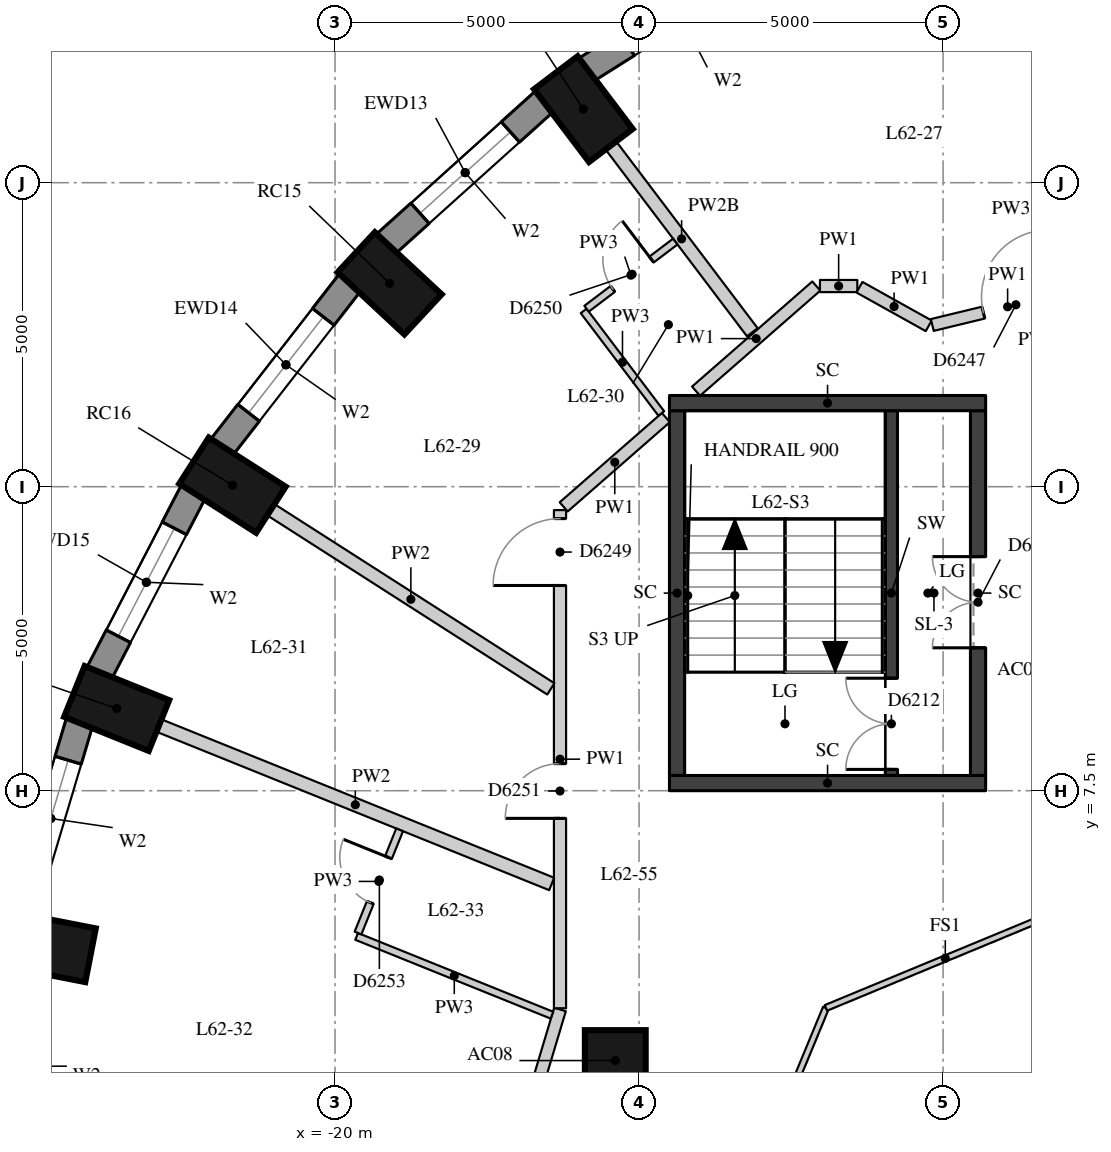
"""IFC4 building model, lengths in metres.
Left out: names, types, materials, properties, quantities, classifications, styles, units other than length and angle.
Written with IfcOpenShell. Run it as: python <this file> out.ifc"""

import sys

from ifc_helpers import new_model, si_unit, direction, frame, frame_2d, origin, origin_2d, place, context, subcontext, project, spatial, rectangle, extrude, element, fill, save


model = new_model("IFC4")
c1 = context("Model", 3, precision=1e-05, world=origin(), true_north=direction((0.0, 1.0)))
c2 = subcontext(c1, "Body", "Model", "MODEL_VIEW")
j1 = project(units=[si_unit("LENGTHUNIT", "METRE"), si_unit("PLANEANGLEUNIT", "RADIAN")], contexts=[c1])
p1 = place(None, origin())
s1 = spatial("IfcSite", under=j1, at=p1, CompositionType="ELEMENT")
p2 = place(p1, origin())
s2 = spatial("IfcBuilding", under=s1, at=p2, CompositionType="ELEMENT")
p3 = place(p2, frame((0.0, 0.0, 218.9)))
s3 = spatial("IfcBuildingStorey", under=s2, at=p3, CompositionType="ELEMENT", Elevation=218.9)
for number, where, z_axis, x_axis in (
    (1, (-15.916, 18.71, 0.0), (0.0, 0.0, 1.0), (-0.604, 0.797, 0.0)),
    (2, (-19.102, 15.845, 0.0), (0.0, 0.0, 1.0), (-0.732, 0.681, 0.0)),
    (3, (-21.687, 12.525, 0.0), (0.0, 0.0, 1.0), (-0.842, 0.539, 0.0)),
    (4, (-23.591, 8.852, 0.0), (0.0, 0.0, 1.0), (-0.927, 0.374, 0.0)),
    (5, (-24.757, 4.937, 0.0), (0.0, 0.0, 1.0), (-0.981, 0.192, 0.0)),
):
    element("IfcColumn", number, at=place(p3, frame(where, z_axis=z_axis, x_axis=x_axis)), inside=s3, PredefinedType="COLUMN", context=c2, shape_type="SweptSolid", body=[
        extrude(rectangle(XDim=1.5, YDim=0.9, at=origin_2d()), origin(), (0.0, 0.0, 1.0), 3.3),
    ])
p4 = place(p3, frame((-15.391, 3.062, 0.0), z_axis=(0.0, 0.0, 1.0), x_axis=(1.0, 0.0, 0.0)))
e6 = element("IfcColumn", 6, at=p4, inside=s3, PredefinedType="COLUMN", context=c2, shape_type="SweptSolid", body=[
    extrude(rectangle(XDim=1.0, YDim=1.0, at=origin_2d()), origin(), (0.0, 0.0, 1.0), 3.3),
])
p5 = place(p3, frame((-12.832, 21.27, 0.0), z_axis=(0.0, 0.0, 1.0), x_axis=(-0.846138482752, -0.532963101918, 0.0)))
e7 = element("IfcWall", 7, at=p5, inside=s3, PredefinedType="SOLIDWALL", context=c2, shape_type="SweptSolid", body=[
    extrude(rectangle(XDim=3.587, YDim=0.45, at=frame_2d((1.793, 0.0))), origin(), (0.0, 0.0, 1.0), 3.02),
])
p6 = place(p5, frame((0.793, 0.0, 0.4)))
e8 = element("IfcOpeningElement", 8, at=p6, cuts=e7, PredefinedType="OPENING", context=c2, shape_type="SweptSolid", body=[
    extrude(rectangle(XDim=2.0, YDim=1.75, at=frame_2d((1.0, 0.875))), frame((0.0, 0.235, 0.0), z_axis=(0.0, -1.0, 0.0), x_axis=(1.0, 0.0, 0.0)), (0.0, 0.0, 1.0), 0.47),
])
p7 = place(p3, frame((-16.553, 18.84, 0.0), z_axis=(0.0, 0.0, 1.0), x_axis=(-0.743442727602, -0.668799604348, 0.0)))
e9 = element("IfcWall", 9, at=p7, inside=s3, PredefinedType="SOLIDWALL", context=c2, shape_type="SweptSolid", body=[
    extrude(rectangle(XDim=3.513, YDim=0.45, at=frame_2d((1.756, 0.0))), origin(), (0.0, 0.0, 1.0), 3.02),
])
p8 = place(p7, frame((0.756, 0.0, 0.4)))
e10 = element("IfcOpeningElement", 10, at=p8, cuts=e9, PredefinedType="OPENING", context=c2, shape_type="SweptSolid", body=[
    extrude(rectangle(XDim=2.0, YDim=1.75, at=frame_2d((1.0, 0.875))), frame((0.0, 0.235, 0.0), z_axis=(0.0, -1.0, 0.0), x_axis=(1.0, 0.0, 0.0)), (0.0, 0.0, 1.0), 0.47),
])
p9 = place(p3, frame((-19.751, 15.861, 0.0), z_axis=(0.0, 0.0, 1.0), x_axis=(-0.614220816451, -0.789134201919, 0.0)))
e11 = element("IfcWall", 11, at=p9, inside=s3, PredefinedType="SOLIDWALL", context=c2, shape_type="SweptSolid", body=[
    extrude(rectangle(XDim=3.438, YDim=0.45, at=frame_2d((1.719, 0.0))), origin(), (0.0, 0.0, 1.0), 3.02),
])
p10 = place(p9, frame((0.719, 0.0, 0.4)))
e12 = element("IfcOpeningElement", 12, at=p10, cuts=e11, PredefinedType="OPENING", context=c2, shape_type="SweptSolid", body=[
    extrude(rectangle(XDim=2.0, YDim=1.75, at=frame_2d((1.0, 0.875))), frame((0.0, 0.235, 0.0), z_axis=(0.0, -1.0, 0.0), x_axis=(1.0, 0.0, 0.0)), (0.0, 0.0, 1.0), 0.47),
])
p11 = place(p3, frame((-22.327, 12.424, 0.0), z_axis=(0.0, 0.0, 1.0), x_axis=(-0.460232593174, -0.887798378113, 0.0)))
e13 = element("IfcWall", 13, at=p11, inside=s3, PredefinedType="SOLIDWALL", context=c2, shape_type="SweptSolid", body=[
    extrude(rectangle(XDim=3.371, YDim=0.45, at=frame_2d((1.685, 0.0))), origin(), (0.0, 0.0, 1.0), 3.02),
])
p12 = place(p11, frame((0.685, 0.0, 0.4)))
e14 = element("IfcOpeningElement", 14, at=p12, cuts=e13, PredefinedType="OPENING", context=c2, shape_type="SweptSolid", body=[
    extrude(rectangle(XDim=2.0, YDim=1.75, at=frame_2d((1.0, 0.875))), frame((0.0, 0.235, 0.0), z_axis=(0.0, -1.0, 0.0), x_axis=(1.0, 0.0, 0.0)), (0.0, 0.0, 1.0), 0.47),
])
p13 = place(p3, frame((-24.2, 8.634, 0.0), z_axis=(0.0, 0.0, 1.0), x_axis=(-0.285444972963, -0.958395099847, 0.0)))
e15 = element("IfcWall", 15, at=p13, inside=s3, PredefinedType="SOLIDWALL", context=c2, shape_type="SweptSolid", body=[
    extrude(rectangle(XDim=3.32, YDim=0.45, at=frame_2d((1.66, 0.0))), origin(), (0.0, 0.0, 1.0), 3.02),
])
p14 = place(p13, frame((0.66, 0.0, 0.4)))
e16 = element("IfcOpeningElement", 16, at=p14, cuts=e15, PredefinedType="OPENING", context=c2, shape_type="SweptSolid", body=[
    extrude(rectangle(XDim=2.0, YDim=1.75, at=frame_2d((1.0, 0.875))), frame((0.0, 0.235, 0.0), z_axis=(0.0, -1.0, 0.0), x_axis=(1.0, 0.0, 0.0)), (0.0, 0.0, 1.0), 0.47),
])
p15 = place(p3, frame((-10.85, 7.75, 0.0), z_axis=(0.0, 0.0, 1.0), x_axis=(0.0, 1.0, 0.0)))
e17 = element("IfcWall", 17, at=p15, inside=s3, PredefinedType="SHEAR", context=c2, shape_type="SweptSolid", body=[
    extrude(rectangle(XDim=6.0, YDim=0.2, at=frame_2d((3.0, 0.0))), origin(), (0.0, 0.0, 1.0), 3.02),
])
p16 = place(p15, frame((0.1, 0.0, 0.0)))
e18 = element("IfcOpeningElement", 18, at=p16, cuts=e17, PredefinedType="OPENING", context=c2, shape_type="SweptSolid", body=[
    extrude(rectangle(XDim=1.5, YDim=2.1, at=frame_2d((0.75, 1.05))), frame((0.0, 0.11, 0.0), z_axis=(0.0, -1.0, 0.0), x_axis=(1.0, 0.0, 0.0)), (0.0, 0.0, 1.0), 0.22),
])
p17 = place(p3, frame((-14.375, 7.75, -0.28), z_axis=(0.0, 0.0, 1.0), x_axis=(0.0, 1.0, 0.0)))
e19 = element("IfcWall", 19, at=p17, inside=s3, PredefinedType="SHEAR", context=c2, shape_type="SweptSolid", body=[
    extrude(rectangle(XDim=6.0, YDim=0.25, at=frame_2d((3.0, 0.0))), origin(), (0.0, 0.0, 1.0), 3.3),
])
p18 = place(p3, frame((-9.425, 7.75, -0.28), z_axis=(0.0, 0.0, 1.0), x_axis=(0.0, 1.0, 0.0)))
e20 = element("IfcWall", 20, at=p18, inside=s3, PredefinedType="SHEAR", context=c2, shape_type="SweptSolid", body=[
    extrude(rectangle(XDim=6.0, YDim=0.25, at=frame_2d((3.0, 0.0))), origin(), (0.0, 0.0, 1.0), 3.3),
])
p19 = place(p18, frame((2.1, 0.0, 0.28)))
e21 = element("IfcOpeningElement", 21, at=p19, cuts=e20, PredefinedType="OPENING", context=c2, shape_type="SweptSolid", body=[
    extrude(rectangle(XDim=1.5, YDim=2.1, at=frame_2d((0.75, 1.05))), frame((0.0, 0.135, 0.0), z_axis=(0.0, -1.0, 0.0), x_axis=(1.0, 0.0, 0.0)), (0.0, 0.0, 1.0), 0.27),
])
for number, where, z_axis, x_axis in (
    (22, (-14.5, 13.875, -0.28), (0.0, 0.0, 1.0), (1.0, 0.0, 0.0)),
    (23, (-14.5, 7.625, -0.28), (0.0, 0.0, 1.0), (1.0, 0.0, 0.0)),
):
    element("IfcWall", number, at=place(p3, frame(where, z_axis=z_axis, x_axis=x_axis)), inside=s3, PredefinedType="SHEAR", context=c2, shape_type="SweptSolid", body=[
        extrude(rectangle(XDim=5.2, YDim=0.25, at=frame_2d((2.6, 0.0))), origin(), (0.0, 0.0, 1.0), 3.3),
    ])
p20 = place(p3, frame((-17.171, 0.995, 0.0), z_axis=(0.0, 0.0, 1.0), x_axis=(0.286919722033, 0.957954629984, 0.0)))
e24 = element("IfcWall", 24, at=p20, inside=s3, PredefinedType="PARTITIONING", context=c2, shape_type="SweptSolid", body=[
    extrude(rectangle(XDim=3.034, YDim=0.2, at=frame_2d((1.517, 0.0))), origin(), (0.0, 0.0, 1.0), 3.02),
])
p21 = place(p20, frame((0.365, 0.0, 0.0)))
e25 = element("IfcOpeningElement", 25, at=p21, cuts=e24, PredefinedType="OPENING", context=c2, shape_type="SweptSolid", body=[
    extrude(rectangle(XDim=1.1, YDim=2.1, at=frame_2d((0.55, 1.05))), frame((0.0, 0.11, 0.0), z_axis=(0.0, -1.0, 0.0), x_axis=(1.0, 0.0, 0.0)), (0.0, 0.0, 1.0), 0.22),
])
p22 = place(p3, frame((-16.3, 3.922, 0.0), z_axis=(0.0, 0.0, 1.0), x_axis=(0.0, 1.0, 0.0)))
e26 = element("IfcWall", 26, at=p22, inside=s3, PredefinedType="PARTITIONING", context=c2, shape_type="SweptSolid", body=[
    extrude(rectangle(XDim=8.193, YDim=0.2, at=frame_2d((4.097, 0.0))), origin(), (0.0, 0.0, 1.0), 3.02),
])
p23 = place(p22, frame((6.953, 0.0, 0.0)))
e27 = element("IfcOpeningElement", 27, at=p23, cuts=e26, PredefinedType="OPENING", context=c2, shape_type="SweptSolid", body=[
    extrude(rectangle(XDim=1.1, YDim=2.1, at=frame_2d((0.55, 1.05))), frame((0.0, 0.11, 0.0), z_axis=(0.0, -1.0, 0.0), x_axis=(1.0, 0.0, 0.0)), (0.0, 0.0, 1.0), 0.22),
])
p24 = place(p22, frame((3.123, 0.0, 0.0)))
e28 = element("IfcOpeningElement", 28, at=p24, cuts=e26, PredefinedType="OPENING", context=c2, shape_type="SweptSolid", body=[
    extrude(rectangle(XDim=0.9, YDim=2.1, at=frame_2d((0.45, 1.05))), frame((0.0, 0.11, 0.0), z_axis=(0.0, -1.0, 0.0), x_axis=(1.0, 0.0, 0.0)), (0.0, 0.0, 1.0), 0.22),
])
p25 = place(p3, frame((-16.24, 12.168, 0.0), z_axis=(0.0, 0.0, 1.0), x_axis=(0.752820521129, 0.658225844956, 0.0)))
e29 = element("IfcWall", 29, at=p25, inside=s3, PredefinedType="PARTITIONING", context=c2, shape_type="SweptSolid", body=[
    extrude(rectangle(XDim=2.232, YDim=0.2, at=frame_2d((1.116, 0.0))), origin(), (0.0, 0.0, 1.0), 3.02),
])
p26 = place(p3, frame((-14.063, 14.071, 0.0), z_axis=(0.0, 0.0, 1.0), x_axis=(0.752870230185, 0.6581689878, 0.0)))
e30 = element("IfcWall", 30, at=p26, inside=s3, PredefinedType="PARTITIONING", context=c2, shape_type="SweptSolid", body=[
    extrude(rectangle(XDim=2.627, YDim=0.2, at=frame_2d((1.313, 0.0))), origin(), (0.0, 0.0, 1.0), 3.02),
])
p27 = place(p3, frame((-12.025, 15.8, 0.0), z_axis=(0.0, 0.0, 1.0), x_axis=(1.0, 0.0, 0.0)))
e31 = element("IfcWall", 31, at=p27, inside=s3, PredefinedType="PARTITIONING", context=c2, shape_type="SweptSolid", body=[
    extrude(rectangle(XDim=0.615, YDim=0.2, at=frame_2d((0.307, 0.0))), origin(), (0.0, 0.0, 1.0), 3.02),
])
p28 = place(p3, frame((-11.375, 15.781, 0.0), z_axis=(0.0, 0.0, 1.0), x_axis=(0.873538410035, -0.486755222051, 0.0)))
e32 = element("IfcWall", 32, at=p28, inside=s3, PredefinedType="PARTITIONING", context=c2, shape_type="SweptSolid", body=[
    extrude(rectangle(XDim=1.304, YDim=0.2, at=frame_2d((0.652, 0.0))), origin(), (0.0, 0.0, 1.0), 3.02),
])
p29 = place(p3, frame((-10.177, 15.16, 0.0), z_axis=(0.0, 0.0, 1.0), x_axis=(0.971984190663, 0.235046236094, 0.0)))
e33 = element("IfcWall", 33, at=p29, inside=s3, PredefinedType="PARTITIONING", context=c2, shape_type="SweptSolid", body=[
    extrude(rectangle(XDim=2.549, YDim=0.2, at=frame_2d((1.274, 0.0))), origin(), (0.0, 0.0, 1.0), 3.02),
])
p30 = place(p29, frame((0.865, 0.0, 0.0)))
e34 = element("IfcOpeningElement", 34, at=p30, cuts=e33, PredefinedType="OPENING", context=c2, shape_type="SweptSolid", body=[
    extrude(rectangle(XDim=1.1, YDim=2.1, at=frame_2d((0.55, 1.05))), frame((0.0, 0.11, 0.0), z_axis=(0.0, -1.0, 0.0), x_axis=(1.0, 0.0, 0.0)), (0.0, 0.0, 1.0), 0.22),
])
p31 = place(p3, frame((-15.463, 18.113, 0.0), z_axis=(0.0, 0.0, 1.0), x_axis=(0.603591792806, -0.79729351412, 0.0)))
e35 = element("IfcWall", 35, at=p31, inside=s3, PredefinedType="PARTITIONING", context=c2, shape_type="SweptSolid", body=[
    extrude(rectangle(XDim=3.854, YDim=0.22, at=frame_2d((1.927, 0.0))), origin(), (0.0, 0.0, 1.0), 2.57),
])
p32 = place(p3, frame((-21.055, 12.121, 0.0), z_axis=(0.0, 0.0, 1.0), x_axis=(0.842286811608, -0.539029616061, 0.0)))
e36 = element("IfcWall", 36, at=p32, inside=s3, PredefinedType="PARTITIONING", context=c2, shape_type="SweptSolid", body=[
    extrude(rectangle(XDim=5.466, YDim=0.22, at=frame_2d((2.733, 0.0))), origin(), (0.0, 0.0, 1.0), 3.02),
])
p33 = place(p3, frame((-22.896, 8.571, 0.0), z_axis=(0.0, 0.0, 1.0), x_axis=(0.927387137769, -0.374103056256, 0.0)))
e37 = element("IfcWall", 37, at=p33, inside=s3, PredefinedType="PARTITIONING", context=c2, shape_type="SweptSolid", body=[
    extrude(rectangle(XDim=6.964, YDim=0.22, at=frame_2d((3.482, 0.0))), origin(), (0.0, 0.0, 1.0), 3.02),
])
p34 = place(p3, frame((-14.634, 13.704, 0.0), z_axis=(0.0, 0.0, 1.0), x_axis=(-0.603613230526, 0.797277284221, 0.0)))
e38 = element("IfcWall", 38, at=p34, inside=s3, PredefinedType="PARTITIONING", context=c2, shape_type="SweptSolid", body=[
    extrude(rectangle(XDim=2.115, YDim=0.12, at=frame_2d((1.058, 0.0))), origin(), (0.0, 0.0, 1.0), 3.02),
])
p35 = place(p3, frame((-16.433, 3.808, 0.0), z_axis=(0.0, 0.0, 1.0), x_axis=(-0.927374031513, 0.374135544522, 0.0)))
e39 = element("IfcWall", 39, at=p35, inside=s3, PredefinedType="PARTITIONING", context=c2, shape_type="SweptSolid", body=[
    extrude(rectangle(XDim=3.464, YDim=0.12, at=frame_2d((1.732, 0.0))), origin(), (0.0, 0.0, 1.0), 3.02),
])
p36 = place(p3, frame((-15.863, 15.427, 0.0), z_axis=(0.0, 0.0, 1.0), x_axis=(0.79730226728, 0.603580230451, 0.0)))
e40 = element("IfcWall", 40, at=p36, inside=s3, PredefinedType="PARTITIONING", context=c2, shape_type="SweptSolid", body=[
    extrude(rectangle(XDim=1.83, YDim=0.12, at=frame_2d((0.915, 0.0))), origin(), (0.0, 0.0, 1.0), 3.02),
])
p37 = place(p36, frame((0.54, 0.0, 0.0)))
e41 = element("IfcOpeningElement", 41, at=p37, cuts=e40, PredefinedType="OPENING", context=c2, shape_type="SweptSolid", body=[
    extrude(rectangle(XDim=0.8, YDim=2.1, at=frame_2d((0.4, 1.05))), frame((0.0, 0.07, 0.0), z_axis=(0.0, -1.0, 0.0), x_axis=(1.0, 0.0, 0.0)), (0.0, 0.0, 1.0), 0.14),
])
p38 = place(p3, frame((-19.622, 5.159, 0.0), z_axis=(0.0, 0.0, 1.0), x_axis=(0.373873925611, 0.927479534948, 0.0)))
e42 = element("IfcWall", 42, at=p38, inside=s3, PredefinedType="PARTITIONING", context=c2, shape_type="SweptSolid", body=[
    extrude(rectangle(XDim=1.83, YDim=0.12, at=frame_2d((0.915, 0.0))), origin(), (0.0, 0.0, 1.0), 3.02),
])
p39 = place(p38, frame((0.54, 0.0, 0.0)))
e43 = element("IfcOpeningElement", 43, at=p39, cuts=e42, PredefinedType="OPENING", context=c2, shape_type="SweptSolid", body=[
    extrude(rectangle(XDim=0.8, YDim=2.1, at=frame_2d((0.4, 1.05))), frame((0.0, 0.07, 0.0), z_axis=(0.0, -1.0, 0.0), x_axis=(1.0, 0.0, 0.0)), (0.0, 0.0, 1.0), 0.14),
])
for number, where, z_axis, x_axis in (
    (44, (-13.554, 0.0, 0.0), (0.0, 0.0, 1.0), (0.383, 0.924, 0.0)),
    (45, (-11.927, 3.927, 0.0), (0.0, 0.0, 1.0), (0.924, 0.383, 0.0)),
):
    element("IfcWall", number, at=place(p3, frame(where, z_axis=z_axis, x_axis=x_axis)), inside=s3, PredefinedType="PARTITIONING", context=c2, shape_type="SweptSolid", body=[
        extrude(rectangle(XDim=4.251, YDim=0.1, at=frame_2d((2.125, 0.0))), origin(), (0.0, 0.0, 1.0), 3.02),
    ])
p40 = place(p8, origin())
e46 = element("IfcWindow", 46, at=p40, inside=s3, PartitioningType="SINGLE_PANEL", PredefinedType="WINDOW", context=c2, shape_type="SweptSolid", body=[
    extrude(rectangle(XDim=2.0, YDim=1.75, at=frame_2d((1.0, 0.875))), frame((0.0, 0.035, 0.0), z_axis=(0.0, -1.0, 0.0), x_axis=(1.0, 0.0, 0.0)), (0.0, 0.0, 1.0), 0.06),
])
fill(e10, e46)
p41 = place(p10, origin())
e47 = element("IfcWindow", 47, at=p41, inside=s3, PartitioningType="SINGLE_PANEL", PredefinedType="WINDOW", context=c2, shape_type="SweptSolid", body=[
    extrude(rectangle(XDim=2.0, YDim=1.75, at=frame_2d((1.0, 0.875))), frame((0.0, 0.035, 0.0), z_axis=(0.0, -1.0, 0.0), x_axis=(1.0, 0.0, 0.0)), (0.0, 0.0, 1.0), 0.06),
])
fill(e12, e47)
p42 = place(p12, origin())
e48 = element("IfcWindow", 48, at=p42, inside=s3, PartitioningType="SINGLE_PANEL", PredefinedType="WINDOW", context=c2, shape_type="SweptSolid", body=[
    extrude(rectangle(XDim=2.0, YDim=1.75, at=frame_2d((1.0, 0.875))), frame((0.0, 0.035, 0.0), z_axis=(0.0, -1.0, 0.0), x_axis=(1.0, 0.0, 0.0)), (0.0, 0.0, 1.0), 0.06),
])
fill(e14, e48)
p43 = place(p14, origin())
e49 = element("IfcWindow", 49, at=p43, inside=s3, PartitioningType="SINGLE_PANEL", PredefinedType="WINDOW", context=c2, shape_type="SweptSolid", body=[
    extrude(rectangle(XDim=2.0, YDim=1.75, at=frame_2d((1.0, 0.875))), frame((0.0, 0.035, 0.0), z_axis=(0.0, -1.0, 0.0), x_axis=(1.0, 0.0, 0.0)), (0.0, 0.0, 1.0), 0.06),
])
fill(e16, e49)
p44 = place(p16, origin())
e50 = element("IfcDoor", 50, at=p44, inside=s3, OperationType="DOUBLE_DOOR_SINGLE_SWING", PredefinedType="DOOR", context=c2, shape_type="SweptSolid", body=[
    extrude(rectangle(XDim=1.5, YDim=2.1, at=frame_2d((0.75, 1.05))), frame((0.0, 0.025, 0.0), z_axis=(0.0, -1.0, 0.0), x_axis=(1.0, 0.0, 0.0)), (0.0, 0.0, 1.0), 0.05),
])
fill(e18, e50)
p45 = place(p19, origin())
e51 = element("IfcDoor", 51, at=p45, inside=s3, OperationType="DOUBLE_DOOR_SINGLE_SWING", PredefinedType="DOOR", context=c2, shape_type="SweptSolid", body=[
    extrude(rectangle(XDim=1.5, YDim=2.1, at=frame_2d((0.75, 1.05))), frame((0.0, 0.025, 0.0), z_axis=(0.0, -1.0, 0.0), x_axis=(1.0, 0.0, 0.0)), (0.0, 0.0, 1.0), 0.05),
])
fill(e21, e51)
p46 = place(p30, origin())
e52 = element("IfcDoor", 52, at=p46, inside=s3, OperationType="SINGLE_SWING_RIGHT", PredefinedType="DOOR", context=c2, shape_type="SweptSolid", body=[
    extrude(rectangle(XDim=1.1, YDim=2.1, at=frame_2d((0.55, 1.05))), frame((0.0, 0.025, 0.0), z_axis=(0.0, -1.0, 0.0), x_axis=(1.0, 0.0, 0.0)), (0.0, 0.0, 1.0), 0.05),
])
fill(e34, e52)
p47 = place(p23, origin())
e53 = element("IfcDoor", 53, at=p47, inside=s3, OperationType="SINGLE_SWING_LEFT", PredefinedType="DOOR", context=c2, shape_type="SweptSolid", body=[
    extrude(rectangle(XDim=1.1, YDim=2.1, at=frame_2d((0.55, 1.05))), frame((0.0, 0.025, 0.0), z_axis=(0.0, -1.0, 0.0), x_axis=(1.0, 0.0, 0.0)), (0.0, 0.0, 1.0), 0.05),
])
fill(e27, e53)
p48 = place(p37, origin())
e54 = element("IfcDoor", 54, at=p48, inside=s3, OperationType="SINGLE_SWING_RIGHT", PredefinedType="DOOR", context=c2, shape_type="SweptSolid", body=[
    extrude(rectangle(XDim=0.8, YDim=2.1, at=frame_2d((0.4, 1.05))), frame((0.0, 0.025, 0.0), z_axis=(0.0, -1.0, 0.0), x_axis=(1.0, 0.0, 0.0)), (0.0, 0.0, 1.0), 0.05),
])
fill(e41, e54)
p49 = place(p24, origin())
e55 = element("IfcDoor", 55, at=p49, inside=s3, OperationType="SINGLE_SWING_LEFT", PredefinedType="DOOR", context=c2, shape_type="SweptSolid", body=[
    extrude(rectangle(XDim=0.9, YDim=2.1, at=frame_2d((0.45, 1.05))), frame((0.0, 0.025, 0.0), z_axis=(0.0, -1.0, 0.0), x_axis=(1.0, 0.0, 0.0)), (0.0, 0.0, 1.0), 0.05),
])
fill(e28, e55)
p50 = place(p39, origin())
e56 = element("IfcDoor", 56, at=p50, inside=s3, OperationType="SINGLE_SWING_RIGHT", PredefinedType="DOOR", context=c2, shape_type="SweptSolid", body=[
    extrude(rectangle(XDim=0.8, YDim=2.1, at=frame_2d((0.4, 1.05))), frame((0.0, 0.025, 0.0), z_axis=(0.0, -1.0, 0.0), x_axis=(1.0, 0.0, 0.0)), (0.0, 0.0, 1.0), 0.05),
])
fill(e43, e56)
save(model, sys.argv[1])
